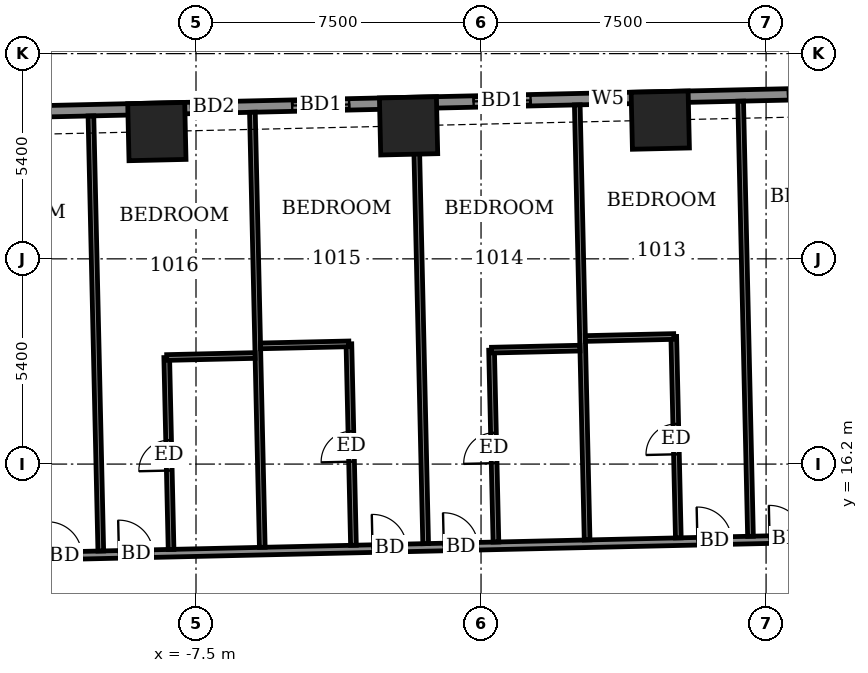
"""IFC4 building model, lengths in metres.
Left out: names, types, materials, properties, quantities, classifications, styles, units other than length and angle.
Written with IfcOpenShell. Run it as: python <this file> out.ifc"""

import sys

from ifc_helpers import new_model, si_unit, direction, frame, frame_2d, origin, origin_2d, place, context, subcontext, project, spatial, rectangle, extrude, element, fill, save


model = new_model("IFC4")
c1 = context("Model", 3, precision=1e-05, world=origin(), true_north=direction((0.0, 1.0)))
c2 = subcontext(c1, "Body", "Model", "MODEL_VIEW")
j1 = project(units=[si_unit("LENGTHUNIT", "METRE"), si_unit("PLANEANGLEUNIT", "RADIAN")], contexts=[c1])
p1 = place(None, origin())
s1 = spatial("IfcSite", under=j1, at=p1, CompositionType="ELEMENT")
p2 = place(p1, origin())
s2 = spatial("IfcBuilding", under=s1, at=p2, CompositionType="ELEMENT")
p3 = place(p2, frame((0.0, 0.0, 44.9)))
s3 = spatial("IfcBuildingStorey", under=s2, at=p3, CompositionType="ELEMENT", Elevation=44.9)
for number, where, z_axis, x_axis in (
    (1, (4.716, 25.25, -0.55), (0.0, 0.0, 1.0), (-1.0, -0.023, 0.0)),
    (2, (-1.907, 25.1, -0.55), (0.0, 0.0, 1.0), (-1.0, -0.023, 0.0)),
    (3, (-8.53, 24.949, -0.55), (0.0, 0.0, 1.0), (-1.0, -0.023, 0.0)),
):
    element("IfcColumn", number, at=place(p3, frame(where, z_axis=z_axis, x_axis=x_axis)), inside=s3, PredefinedType="COLUMN", context=c2, shape_type="SweptSolid", body=[
        extrude(rectangle(XDim=1.5, YDim=1.5, at=origin_2d()), origin(), (0.0, 0.0, 1.0), 3.6),
    ])
p4 = place(p3, frame((24.423, 26.298, 0.0), z_axis=(0.0, 0.0, 1.0), x_axis=(-0.999742433108, -0.022695097355, 0.0)))
e4 = element("IfcWall", 4, at=p4, inside=s3, PredefinedType="SOLIDWALL", context=c2, shape_type="SweptSolid", body=[
    extrude(rectangle(XDim=52.701, YDim=0.3, at=frame_2d((26.35, 0.0))), origin(), (0.0, 0.0, 1.0), 3.05),
])
p5 = place(p4, frame((2.009, 0.0, 0.0)))
e5 = element("IfcOpeningElement", 5, at=p5, cuts=e4, PredefinedType="OPENING", context=c2, shape_type="SweptSolid", body=[
    extrude(rectangle(XDim=1.5, YDim=2.4, at=frame_2d((0.75, 1.2))), frame((0.0, 0.16, 0.0), z_axis=(0.0, -1.0, 0.0), x_axis=(1.0, 0.0, 0.0)), (0.0, 0.0, 1.0), 0.32),
])
p6 = place(p4, frame((7.337, 0.0, 0.0)))
e6 = element("IfcOpeningElement", 6, at=p6, cuts=e4, PredefinedType="OPENING", context=c2, shape_type="SweptSolid", body=[
    extrude(rectangle(XDim=1.2, YDim=2.4, at=frame_2d((0.6, 1.2))), frame((0.0, 0.16, 0.0), z_axis=(0.0, -1.0, 0.0), x_axis=(1.0, 0.0, 0.0)), (0.0, 0.0, 1.0), 0.32),
])
p7 = place(p4, frame((10.0, 0.0, 0.0)))
e7 = element("IfcOpeningElement", 7, at=p7, cuts=e4, PredefinedType="OPENING", context=c2, shape_type="SweptSolid", body=[
    extrude(rectangle(XDim=1.5, YDim=2.4, at=frame_2d((0.75, 1.2))), frame((0.0, 0.16, 0.0), z_axis=(0.0, -1.0, 0.0), x_axis=(1.0, 0.0, 0.0)), (0.0, 0.0, 1.0), 0.32),
])
p8 = place(p4, frame((14.85, 0.0, 0.0)))
e8 = element("IfcOpeningElement", 8, at=p8, cuts=e4, PredefinedType="OPENING", context=c2, shape_type="SweptSolid", body=[
    extrude(rectangle(XDim=1.5, YDim=2.4, at=frame_2d((0.75, 1.2))), frame((0.0, 0.16, 0.0), z_axis=(0.0, -1.0, 0.0), x_axis=(1.0, 0.0, 0.0)), (0.0, 0.0, 1.0), 0.32),
])
p9 = place(p4, frame((20.638, 0.0, 0.9)))
e9 = element("IfcOpeningElement", 9, at=p9, cuts=e4, PredefinedType="OPENING", context=c2, shape_type="SweptSolid", body=[
    extrude(rectangle(XDim=0.9, YDim=1.5, at=frame_2d((0.45, 0.75))), frame((0.0, 0.16, 0.0), z_axis=(0.0, -1.0, 0.0), x_axis=(1.0, 0.0, 0.0)), (0.0, 0.0, 1.0), 0.32),
])
p10 = place(p4, frame((23.125, 0.0, 0.0)))
e10 = element("IfcOpeningElement", 10, at=p10, cuts=e4, PredefinedType="OPENING", context=c2, shape_type="SweptSolid", body=[
    extrude(rectangle(XDim=1.5, YDim=2.4, at=frame_2d((0.75, 1.2))), frame((0.0, 0.16, 0.0), z_axis=(0.0, -1.0, 0.0), x_axis=(1.0, 0.0, 0.0)), (0.0, 0.0, 1.0), 0.32),
])
p11 = place(p4, frame((27.9, 0.0, 0.0)))
e11 = element("IfcOpeningElement", 11, at=p11, cuts=e4, PredefinedType="OPENING", context=c2, shape_type="SweptSolid", body=[
    extrude(rectangle(XDim=1.5, YDim=2.4, at=frame_2d((0.75, 1.2))), frame((0.0, 0.16, 0.0), z_axis=(0.0, -1.0, 0.0), x_axis=(1.0, 0.0, 0.0)), (0.0, 0.0, 1.0), 0.32),
])
p12 = place(p4, frame((30.862, 0.0, 0.0)))
e12 = element("IfcOpeningElement", 12, at=p12, cuts=e4, PredefinedType="OPENING", context=c2, shape_type="SweptSolid", body=[
    extrude(rectangle(XDim=1.2, YDim=2.4, at=frame_2d((0.6, 1.2))), frame((0.0, 0.16, 0.0), z_axis=(0.0, -1.0, 0.0), x_axis=(1.0, 0.0, 0.0)), (0.0, 0.0, 1.0), 0.32),
])
p13 = place(p4, frame((36.1, 0.0, 0.0)))
e13 = element("IfcOpeningElement", 13, at=p13, cuts=e4, PredefinedType="OPENING", context=c2, shape_type="SweptSolid", body=[
    extrude(rectangle(XDim=1.5, YDim=2.4, at=frame_2d((0.75, 1.2))), frame((0.0, 0.16, 0.0), z_axis=(0.0, -1.0, 0.0), x_axis=(1.0, 0.0, 0.0)), (0.0, 0.0, 1.0), 0.32),
])
p14 = place(p4, frame((40.975, 0.0, 0.0)))
e14 = element("IfcOpeningElement", 14, at=p14, cuts=e4, PredefinedType="OPENING", context=c2, shape_type="SweptSolid", body=[
    extrude(rectangle(XDim=1.5, YDim=2.4, at=frame_2d((0.75, 1.2))), frame((0.0, 0.16, 0.0), z_axis=(0.0, -1.0, 0.0), x_axis=(1.0, 0.0, 0.0)), (0.0, 0.0, 1.0), 0.32),
])
p15 = place(p4, frame((43.788, 0.0, 0.0)))
e15 = element("IfcOpeningElement", 15, at=p15, cuts=e4, PredefinedType="OPENING", context=c2, shape_type="SweptSolid", body=[
    extrude(rectangle(XDim=1.5, YDim=2.4, at=frame_2d((0.75, 1.2))), frame((0.0, 0.16, 0.0), z_axis=(0.0, -1.0, 0.0), x_axis=(1.0, 0.0, 0.0)), (0.0, 0.0, 1.0), 0.32),
])
p16 = place(p4, frame((48.464, 0.0, 0.9)))
e16 = element("IfcOpeningElement", 16, at=p16, cuts=e4, PredefinedType="OPENING", context=c2, shape_type="SweptSolid", body=[
    extrude(rectangle(XDim=2.4, YDim=1.5, at=frame_2d((1.2, 0.75))), frame((0.0, 0.16, 0.0), z_axis=(0.0, -1.0, 0.0), x_axis=(1.0, 0.0, 0.0)), (0.0, 0.0, 1.0), 0.32),
])
p17 = place(p3, frame((2.746, 27.256, 0.0), z_axis=(0.0, 0.0, 1.0), x_axis=(0.999743073592, 0.022666865795, 0.0)))
e17 = element("IfcWall", 17, at=p17, inside=s3, PredefinedType="USERDEFINED", context=c2, shape_type="SweptSolid", body=[
    extrude(rectangle(XDim=5.999, YDim=0.55, at=frame_2d((3.0, 0.0))), origin(), (0.0, 0.0, 1.0), 0.8),
])
p18 = place(p3, frame((-17.249, 26.802, 0.0), z_axis=(0.0, 0.0, 1.0), x_axis=(0.999743094499, 0.022665943652, 0.0)))
e18 = element("IfcWall", 18, at=p18, inside=s3, PredefinedType="USERDEFINED", context=c2, shape_type="SweptSolid", body=[
    extrude(rectangle(XDim=6.0, YDim=0.55, at=frame_2d((3.0, 0.0))), origin(), (0.0, 0.0, 1.0), 0.8),
])
p19 = place(p3, frame((-31.347, 13.329, 0.0), z_axis=(0.0, 0.0, 1.0), x_axis=(0.999742613079, 0.022687168058, 0.0)))
e19 = element("IfcWall", 19, at=p19, inside=s3, PredefinedType="PARTITIONING", context=c2, shape_type="SweptSolid", body=[
    extrude(rectangle(XDim=58.799, YDim=0.2, at=frame_2d((29.399, 0.0))), origin(), (0.0, 0.0, 1.0), 3.05),
])
p20 = place(p19, frame((56.675, 0.0, 0.0)))
e20 = element("IfcOpeningElement", 20, at=p20, cuts=e19, PredefinedType="OPENING", context=c2, shape_type="SweptSolid", body=[
    extrude(rectangle(XDim=1.0, YDim=2.1, at=frame_2d((0.5, 1.05))), frame((0.0, 0.11, 0.0), z_axis=(0.0, -1.0, 0.0), x_axis=(1.0, 0.0, 0.0)), (0.0, 0.0, 1.0), 0.22),
])
p21 = place(p19, frame((52.4, 0.0, 0.0)))
e21 = element("IfcOpeningElement", 21, at=p21, cuts=e19, PredefinedType="OPENING", context=c2, shape_type="SweptSolid", body=[
    extrude(rectangle(XDim=0.9, YDim=2.1, at=frame_2d((0.45, 1.05))), frame((0.0, 0.11, 0.0), z_axis=(0.0, -1.0, 0.0), x_axis=(1.0, 0.0, 0.0)), (0.0, 0.0, 1.0), 0.22),
])
p22 = place(p19, frame((47.7, 0.0, 0.0)))
e22 = element("IfcOpeningElement", 22, at=p22, cuts=e19, PredefinedType="OPENING", context=c2, shape_type="SweptSolid", body=[
    extrude(rectangle(XDim=0.9, YDim=2.1, at=frame_2d((0.45, 1.05))), frame((0.0, 0.11, 0.0), z_axis=(0.0, -1.0, 0.0), x_axis=(1.0, 0.0, 0.0)), (0.0, 0.0, 1.0), 0.22),
])
p23 = place(p19, frame((45.7, 0.0, 0.0)))
e23 = element("IfcOpeningElement", 23, at=p23, cuts=e19, PredefinedType="OPENING", context=c2, shape_type="SweptSolid", body=[
    extrude(rectangle(XDim=0.9, YDim=2.1, at=frame_2d((0.45, 1.05))), frame((0.0, 0.11, 0.0), z_axis=(0.0, -1.0, 0.0), x_axis=(1.0, 0.0, 0.0)), (0.0, 0.0, 1.0), 0.22),
])
p24 = place(p19, frame((38.95, 0.0, 0.0)))
e24 = element("IfcOpeningElement", 24, at=p24, cuts=e19, PredefinedType="OPENING", context=c2, shape_type="SweptSolid", body=[
    extrude(rectangle(XDim=0.9, YDim=2.1, at=frame_2d((0.45, 1.05))), frame((0.0, 0.11, 0.0), z_axis=(0.0, -1.0, 0.0), x_axis=(1.0, 0.0, 0.0)), (0.0, 0.0, 1.0), 0.22),
])
p25 = place(p19, frame((37.05, 0.0, 0.0)))
e25 = element("IfcOpeningElement", 25, at=p25, cuts=e19, PredefinedType="OPENING", context=c2, shape_type="SweptSolid", body=[
    extrude(rectangle(XDim=0.9, YDim=2.1, at=frame_2d((0.45, 1.05))), frame((0.0, 0.11, 0.0), z_axis=(0.0, -1.0, 0.0), x_axis=(1.0, 0.0, 0.0)), (0.0, 0.0, 1.0), 0.22),
])
p26 = place(p19, frame((30.375, 0.0, 0.0)))
e26 = element("IfcOpeningElement", 26, at=p26, cuts=e19, PredefinedType="OPENING", context=c2, shape_type="SweptSolid", body=[
    extrude(rectangle(XDim=0.9, YDim=2.1, at=frame_2d((0.45, 1.05))), frame((0.0, 0.11, 0.0), z_axis=(0.0, -1.0, 0.0), x_axis=(1.0, 0.0, 0.0)), (0.0, 0.0, 1.0), 0.22),
])
p27 = place(p19, frame((28.5, 0.0, 0.0)))
e27 = element("IfcOpeningElement", 27, at=p27, cuts=e19, PredefinedType="OPENING", context=c2, shape_type="SweptSolid", body=[
    extrude(rectangle(XDim=0.9, YDim=2.1, at=frame_2d((0.45, 1.05))), frame((0.0, 0.11, 0.0), z_axis=(0.0, -1.0, 0.0), x_axis=(1.0, 0.0, 0.0)), (0.0, 0.0, 1.0), 0.22),
])
p28 = place(p19, frame((21.825, 0.0, 0.0)))
e28 = element("IfcOpeningElement", 28, at=p28, cuts=e19, PredefinedType="OPENING", context=c2, shape_type="SweptSolid", body=[
    extrude(rectangle(XDim=0.9, YDim=2.1, at=frame_2d((0.45, 1.05))), frame((0.0, 0.11, 0.0), z_axis=(0.0, -1.0, 0.0), x_axis=(1.0, 0.0, 0.0)), (0.0, 0.0, 1.0), 0.22),
])
p29 = place(p19, frame((19.95, 0.0, 0.0)))
e29 = element("IfcOpeningElement", 29, at=p29, cuts=e19, PredefinedType="OPENING", context=c2, shape_type="SweptSolid", body=[
    extrude(rectangle(XDim=0.9, YDim=2.1, at=frame_2d((0.45, 1.05))), frame((0.0, 0.11, 0.0), z_axis=(0.0, -1.0, 0.0), x_axis=(1.0, 0.0, 0.0)), (0.0, 0.0, 1.0), 0.22),
])
p30 = place(p19, frame((13.225, 0.0, 0.0)))
e30 = element("IfcOpeningElement", 30, at=p30, cuts=e19, PredefinedType="OPENING", context=c2, shape_type="SweptSolid", body=[
    extrude(rectangle(XDim=0.9, YDim=2.1, at=frame_2d((0.45, 1.05))), frame((0.0, 0.11, 0.0), z_axis=(0.0, -1.0, 0.0), x_axis=(1.0, 0.0, 0.0)), (0.0, 0.0, 1.0), 0.22),
])
p31 = place(p19, frame((11.25, 0.0, 0.0)))
e31 = element("IfcOpeningElement", 31, at=p31, cuts=e19, PredefinedType="OPENING", context=c2, shape_type="SweptSolid", body=[
    extrude(rectangle(XDim=0.9, YDim=2.1, at=frame_2d((0.45, 1.05))), frame((0.0, 0.11, 0.0), z_axis=(0.0, -1.0, 0.0), x_axis=(1.0, 0.0, 0.0)), (0.0, 0.0, 1.0), 0.22),
])
p32 = place(p19, frame((1.75, 0.0, 0.0)))
e32 = element("IfcOpeningElement", 32, at=p32, cuts=e19, PredefinedType="OPENING", context=c2, shape_type="SweptSolid", body=[
    extrude(rectangle(XDim=1.0, YDim=2.1, at=frame_2d((0.5, 1.05))), frame((0.0, 0.11, 0.0), z_axis=(0.0, -1.0, 0.0), x_axis=(1.0, 0.0, 0.0)), (0.0, 0.0, 1.0), 0.22),
])
p33 = place(p19, frame((6.65, 0.0, 0.0)))
e33 = element("IfcOpeningElement", 33, at=p33, cuts=e19, PredefinedType="OPENING", context=c2, shape_type="SweptSolid", body=[
    extrude(rectangle(XDim=0.9, YDim=2.1, at=frame_2d((0.45, 1.05))), frame((0.0, 0.11, 0.0), z_axis=(0.0, -1.0, 0.0), x_axis=(1.0, 0.0, 0.0)), (0.0, 0.0, 1.0), 0.22),
])
p34 = place(p3, frame((-10.005, 13.913, 0.0), z_axis=(0.0, 0.0, 1.0), x_axis=(-0.022706391805, 0.999742176649, 0.0)))
e34 = element("IfcWall", 34, at=p34, inside=s3, PredefinedType="PARTITIONING", context=c2, shape_type="SweptSolid", body=[
    extrude(rectangle(XDim=11.451, YDim=0.15, at=frame_2d((5.726, 0.0))), origin(), (0.0, 0.0, 1.0), 2.55),
])
p35 = place(p3, frame((-8.156, 13.955, 0.0), z_axis=(0.0, 0.0, 1.0), x_axis=(-0.022576449265, 0.999745119487, 0.0)))
e35 = element("IfcWall", 35, at=p35, inside=s3, PredefinedType="PARTITIONING", context=c2, shape_type="SweptSolid", body=[
    extrude(rectangle(XDim=5.05, YDim=0.15, at=frame_2d((2.525, 0.0))), origin(), (0.0, 0.0, 1.0), 3.05),
])
p36 = place(p35, frame((2.075, 0.0, 0.0)))
e36 = element("IfcOpeningElement", 36, at=p36, cuts=e35, PredefinedType="OPENING", context=c2, shape_type="SweptSolid", body=[
    extrude(rectangle(XDim=0.8, YDim=2.1, at=frame_2d((0.4, 1.05))), frame((0.0, 0.085, 0.0), z_axis=(0.0, -1.0, 0.0), x_axis=(1.0, 0.0, 0.0)), (0.0, 0.0, 1.0), 0.17),
])
p37 = place(p3, frame((-5.756, 14.01, 0.0), z_axis=(0.0, 0.0, 1.0), x_axis=(-0.022708327922, 0.999742132674, 0.0)))
e37 = element("IfcWall", 37, at=p37, inside=s3, PredefinedType="PARTITIONING", context=c2, shape_type="SweptSolid", body=[
    extrude(rectangle(XDim=11.45, YDim=0.15, at=frame_2d((5.725, 0.0))), origin(), (0.0, 0.0, 1.0), 2.55),
])
p38 = place(p3, frame((-3.357, 14.064, 0.0), z_axis=(0.0, 0.0, 1.0), x_axis=(-0.022661766832, 0.999743189186, 0.0)))
e38 = element("IfcWall", 38, at=p38, inside=s3, PredefinedType="PARTITIONING", context=c2, shape_type="SweptSolid", body=[
    extrude(rectangle(XDim=5.301, YDim=0.15, at=frame_2d((2.65, 0.0))), origin(), (0.0, 0.0, 1.0), 3.05),
])
p39 = place(p38, frame((2.2, 0.0, 0.0)))
e39 = element("IfcOpeningElement", 39, at=p39, cuts=e38, PredefinedType="OPENING", context=c2, shape_type="SweptSolid", body=[
    extrude(rectangle(XDim=0.8, YDim=2.1, at=frame_2d((0.4, 1.05))), frame((0.0, 0.085, 0.0), z_axis=(0.0, -1.0, 0.0), x_axis=(1.0, 0.0, 0.0)), (0.0, 0.0, 1.0), 0.17),
])
p40 = place(p3, frame((-1.457, 14.107, 0.0), z_axis=(0.0, 0.0, 1.0), x_axis=(-0.022706391805, 0.999742176649, 0.0)))
e40 = element("IfcWall", 40, at=p40, inside=s3, PredefinedType="PARTITIONING", context=c2, shape_type="SweptSolid", body=[
    extrude(rectangle(XDim=11.451, YDim=0.15, at=frame_2d((5.726, 0.0))), origin(), (0.0, 0.0, 1.0), 3.05),
])
p41 = place(p3, frame((0.392, 14.149, 0.0), z_axis=(0.0, 0.0, 1.0), x_axis=(-0.022768623305, 0.999740761294, 0.0)))
e41 = element("IfcWall", 41, at=p41, inside=s3, PredefinedType="PARTITIONING", context=c2, shape_type="SweptSolid", body=[
    extrude(rectangle(XDim=5.05, YDim=0.15, at=frame_2d((2.525, 0.0))), origin(), (0.0, 0.0, 1.0), 3.05),
])
p42 = place(p41, frame((2.075, 0.0, 0.0)))
e42 = element("IfcOpeningElement", 42, at=p42, cuts=e41, PredefinedType="OPENING", context=c2, shape_type="SweptSolid", body=[
    extrude(rectangle(XDim=0.8, YDim=2.1, at=frame_2d((0.4, 1.05))), frame((0.0, 0.085, 0.0), z_axis=(0.0, -1.0, 0.0), x_axis=(1.0, 0.0, 0.0)), (0.0, 0.0, 1.0), 0.17),
])
p43 = place(p3, frame((2.791, 14.204, 0.0), z_axis=(0.0, 0.0, 1.0), x_axis=(-0.022623564427, 0.999744054412, 0.0)))
e43 = element("IfcWall", 43, at=p43, inside=s3, PredefinedType="PARTITIONING", context=c2, shape_type="SweptSolid", body=[
    extrude(rectangle(XDim=11.45, YDim=0.15, at=frame_2d((5.725, 0.0))), origin(), (0.0, 0.0, 1.0), 2.55),
])
p44 = place(p3, frame((5.191, 14.258, 0.0), z_axis=(0.0, 0.0, 1.0), x_axis=(-0.022616771387, 0.999744208111, 0.0)))
e44 = element("IfcWall", 44, at=p44, inside=s3, PredefinedType="PARTITIONING", context=c2, shape_type="SweptSolid", body=[
    extrude(rectangle(XDim=5.3, YDim=0.15, at=frame_2d((2.65, 0.0))), origin(), (0.0, 0.0, 1.0), 3.05),
])
p45 = place(p44, frame((2.2, 0.0, 0.0)))
e45 = element("IfcOpeningElement", 45, at=p45, cuts=e44, PredefinedType="OPENING", context=c2, shape_type="SweptSolid", body=[
    extrude(rectangle(XDim=0.8, YDim=2.1, at=frame_2d((0.4, 1.05))), frame((0.0, 0.085, 0.0), z_axis=(0.0, -1.0, 0.0), x_axis=(1.0, 0.0, 0.0)), (0.0, 0.0, 1.0), 0.17),
])
p46 = place(p3, frame((7.09, 14.301, 0.0), z_axis=(0.0, 0.0, 1.0), x_axis=(-0.022621153305, 0.999744108971, 0.0)))
e46 = element("IfcWall", 46, at=p46, inside=s3, PredefinedType="PARTITIONING", context=c2, shape_type="SweptSolid", body=[
    extrude(rectangle(XDim=11.451, YDim=0.15, at=frame_2d((5.726, 0.0))), origin(), (0.0, 0.0, 1.0), 2.55),
])
p47 = place(p3, frame((-8.27, 19.004, 0.0), z_axis=(0.0, 0.0, 1.0), x_axis=(0.999740260747, 0.02279059109, 0.0)))
e47 = element("IfcWall", 47, at=p47, inside=s3, PredefinedType="PARTITIONING", context=c2, shape_type="SweptSolid", body=[
    extrude(rectangle(XDim=2.324, YDim=0.15, at=frame_2d((1.162, 0.0))), origin(), (0.0, 0.0, 1.0), 3.05),
])
for number, where, z_axis, x_axis in (
    (48, (0.277, 19.198, 0.0), (0.0, 0.0, 1.0), (1.0, 0.023, 0.0)),
    (49, (-5.802, 19.31, 0.0), (0.0, 0.0, 1.0), (1.0, 0.023, 0.0)),
    (50, (2.746, 19.504, 0.0), (0.0, 0.0, 1.0), (1.0, 0.023, 0.0)),
):
    element("IfcWall", number, at=place(p3, frame(where, z_axis=z_axis, x_axis=x_axis)), inside=s3, PredefinedType="PARTITIONING", context=c2, shape_type="SweptSolid", body=[
        extrude(rectangle(XDim=2.325, YDim=0.15, at=frame_2d((1.163, 0.0))), origin(), (0.0, 0.0, 1.0), 3.05),
    ])
p48 = place(p8, origin())
e51 = element("IfcDoor", 51, at=p48, inside=s3, OperationType="SLIDING_TO_LEFT", PredefinedType="DOOR", context=c2, shape_type="SweptSolid", body=[
    extrude(rectangle(XDim=1.5, YDim=2.4, at=frame_2d((0.75, 1.2))), frame((0.0, 0.025, 0.0), z_axis=(0.0, -1.0, 0.0), x_axis=(1.0, 0.0, 0.0)), (0.0, 0.0, 1.0), 0.05),
])
fill(e8, e51)
p49 = place(p9, origin())
e52 = element("IfcWindow", 52, at=p49, inside=s3, PartitioningType="SINGLE_PANEL", PredefinedType="WINDOW", context=c2, shape_type="SweptSolid", body=[
    extrude(rectangle(XDim=0.9, YDim=1.5, at=frame_2d((0.45, 0.75))), frame((0.0, 0.03, 0.0), z_axis=(0.0, -1.0, 0.0), x_axis=(1.0, 0.0, 0.0)), (0.0, 0.0, 1.0), 0.06),
])
fill(e9, e52)
p50 = place(p10, origin())
e53 = element("IfcDoor", 53, at=p50, inside=s3, OperationType="SLIDING_TO_LEFT", PredefinedType="DOOR", context=c2, shape_type="SweptSolid", body=[
    extrude(rectangle(XDim=1.5, YDim=2.4, at=frame_2d((0.75, 1.2))), frame((0.0, 0.025, 0.0), z_axis=(0.0, -1.0, 0.0), x_axis=(1.0, 0.0, 0.0)), (0.0, 0.0, 1.0), 0.05),
])
fill(e10, e53)
p51 = place(p11, origin())
e54 = element("IfcDoor", 54, at=p51, inside=s3, OperationType="SLIDING_TO_LEFT", PredefinedType="DOOR", context=c2, shape_type="SweptSolid", body=[
    extrude(rectangle(XDim=1.5, YDim=2.4, at=frame_2d((0.75, 1.2))), frame((0.0, 0.025, 0.0), z_axis=(0.0, -1.0, 0.0), x_axis=(1.0, 0.0, 0.0)), (0.0, 0.0, 1.0), 0.05),
])
fill(e11, e54)
p52 = place(p12, origin())
e55 = element("IfcDoor", 55, at=p52, inside=s3, OperationType="SLIDING_TO_LEFT", PredefinedType="DOOR", context=c2, shape_type="SweptSolid", body=[
    extrude(rectangle(XDim=1.2, YDim=2.4, at=frame_2d((0.6, 1.2))), frame((0.0, 0.025, 0.0), z_axis=(0.0, -1.0, 0.0), x_axis=(1.0, 0.0, 0.0)), (0.0, 0.0, 1.0), 0.05),
])
fill(e12, e55)
p53 = place(p24, origin())
e56 = element("IfcDoor", 56, at=p53, inside=s3, OperationType="SINGLE_SWING_RIGHT", PredefinedType="DOOR", context=c2, shape_type="SweptSolid", body=[
    extrude(rectangle(XDim=0.9, YDim=2.1, at=frame_2d((0.45, 1.05))), frame((0.0, 0.025, 0.0), z_axis=(0.0, -1.0, 0.0), x_axis=(1.0, 0.0, 0.0)), (0.0, 0.0, 1.0), 0.05),
])
fill(e24, e56)
p54 = place(p25, origin())
e57 = element("IfcDoor", 57, at=p54, inside=s3, OperationType="SINGLE_SWING_LEFT", PredefinedType="DOOR", context=c2, shape_type="SweptSolid", body=[
    extrude(rectangle(XDim=0.9, YDim=2.1, at=frame_2d((0.45, 1.05))), frame((0.0, 0.025, 0.0), z_axis=(0.0, -1.0, 0.0), x_axis=(1.0, 0.0, 0.0)), (0.0, 0.0, 1.0), 0.05),
])
fill(e25, e57)
p55 = place(p45, origin())
e58 = element("IfcDoor", 58, at=p55, inside=s3, OperationType="SINGLE_SWING_LEFT", PredefinedType="DOOR", context=c2, shape_type="SweptSolid", body=[
    extrude(rectangle(XDim=0.8, YDim=2.1, at=frame_2d((0.4, 1.05))), frame((0.0, 0.025, 0.0), z_axis=(0.0, -1.0, 0.0), x_axis=(1.0, 0.0, 0.0)), (0.0, 0.0, 1.0), 0.05),
])
fill(e45, e58)
p56 = place(p26, origin())
e59 = element("IfcDoor", 59, at=p56, inside=s3, OperationType="SINGLE_SWING_RIGHT", PredefinedType="DOOR", context=c2, shape_type="SweptSolid", body=[
    extrude(rectangle(XDim=0.9, YDim=2.1, at=frame_2d((0.45, 1.05))), frame((0.0, 0.025, 0.0), z_axis=(0.0, -1.0, 0.0), x_axis=(1.0, 0.0, 0.0)), (0.0, 0.0, 1.0), 0.05),
])
fill(e26, e59)
p57 = place(p42, origin())
e60 = element("IfcDoor", 60, at=p57, inside=s3, OperationType="SINGLE_SWING_RIGHT", PredefinedType="DOOR", context=c2, shape_type="SweptSolid", body=[
    extrude(rectangle(XDim=0.8, YDim=2.1, at=frame_2d((0.4, 1.05))), frame((0.0, 0.025, 0.0), z_axis=(0.0, -1.0, 0.0), x_axis=(1.0, 0.0, 0.0)), (0.0, 0.0, 1.0), 0.05),
])
fill(e42, e60)
p58 = place(p27, origin())
e61 = element("IfcDoor", 61, at=p58, inside=s3, OperationType="SINGLE_SWING_LEFT", PredefinedType="DOOR", context=c2, shape_type="SweptSolid", body=[
    extrude(rectangle(XDim=0.9, YDim=2.1, at=frame_2d((0.45, 1.05))), frame((0.0, 0.025, 0.0), z_axis=(0.0, -1.0, 0.0), x_axis=(1.0, 0.0, 0.0)), (0.0, 0.0, 1.0), 0.05),
])
fill(e27, e61)
p59 = place(p39, origin())
e62 = element("IfcDoor", 62, at=p59, inside=s3, OperationType="SINGLE_SWING_LEFT", PredefinedType="DOOR", context=c2, shape_type="SweptSolid", body=[
    extrude(rectangle(XDim=0.8, YDim=2.1, at=frame_2d((0.4, 1.05))), frame((0.0, 0.025, 0.0), z_axis=(0.0, -1.0, 0.0), x_axis=(1.0, 0.0, 0.0)), (0.0, 0.0, 1.0), 0.05),
])
fill(e39, e62)
p60 = place(p28, origin())
e63 = element("IfcDoor", 63, at=p60, inside=s3, OperationType="SINGLE_SWING_RIGHT", PredefinedType="DOOR", context=c2, shape_type="SweptSolid", body=[
    extrude(rectangle(XDim=0.9, YDim=2.1, at=frame_2d((0.45, 1.05))), frame((0.0, 0.025, 0.0), z_axis=(0.0, -1.0, 0.0), x_axis=(1.0, 0.0, 0.0)), (0.0, 0.0, 1.0), 0.05),
])
fill(e28, e63)
p61 = place(p36, origin())
e64 = element("IfcDoor", 64, at=p61, inside=s3, OperationType="SINGLE_SWING_RIGHT", PredefinedType="DOOR", context=c2, shape_type="SweptSolid", body=[
    extrude(rectangle(XDim=0.8, YDim=2.1, at=frame_2d((0.4, 1.05))), frame((0.0, 0.025, 0.0), z_axis=(0.0, -1.0, 0.0), x_axis=(1.0, 0.0, 0.0)), (0.0, 0.0, 1.0), 0.05),
])
fill(e36, e64)
p62 = place(p29, origin())
e65 = element("IfcDoor", 65, at=p62, inside=s3, OperationType="SINGLE_SWING_LEFT", PredefinedType="DOOR", context=c2, shape_type="SweptSolid", body=[
    extrude(rectangle(XDim=0.9, YDim=2.1, at=frame_2d((0.45, 1.05))), frame((0.0, 0.025, 0.0), z_axis=(0.0, -1.0, 0.0), x_axis=(1.0, 0.0, 0.0)), (0.0, 0.0, 1.0), 0.05),
])
fill(e29, e65)
save(model, sys.argv[1])
